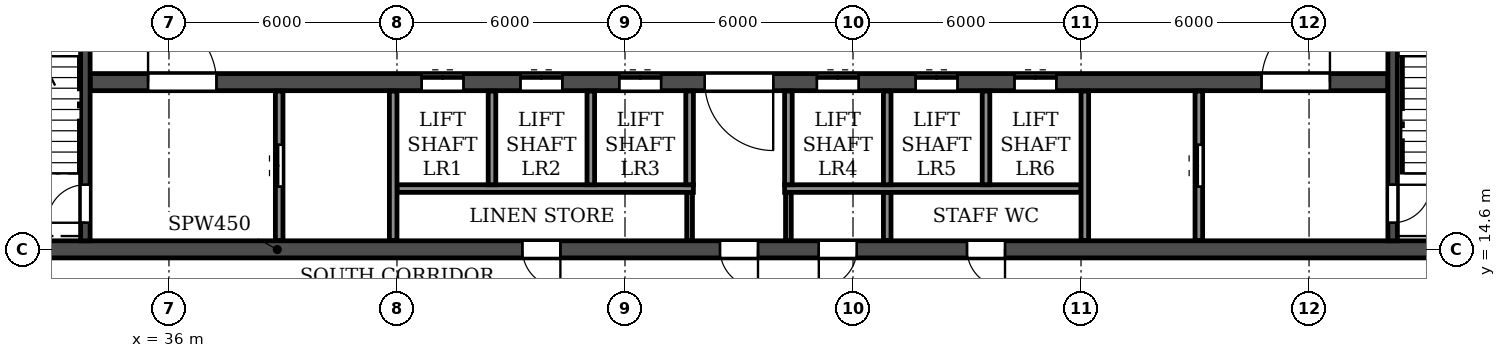
"""IFC4 building model, lengths in metres.
Left out: names, types, materials, properties, quantities, classifications, styles, units other than length and angle.
Written with IfcOpenShell. Run it as: python <this file> out.ifc"""

import sys

from ifc_helpers import new_model, si_unit, direction, frame, frame_2d, origin, place, context, subcontext, project, spatial, rectangle, extrude, element, fill, save


model = new_model("IFC4")
c1 = context("Model", 3, precision=1e-05, world=origin(), true_north=direction((0.0, 1.0)))
c2 = subcontext(c1, "Body", "Model", "MODEL_VIEW")
j1 = project(units=[si_unit("LENGTHUNIT", "METRE"), si_unit("PLANEANGLEUNIT", "RADIAN")], contexts=[c1])
p1 = place(None, origin())
s1 = spatial("IfcSite", under=j1, at=p1, CompositionType="ELEMENT")
p2 = place(p1, origin())
s2 = spatial("IfcBuilding", under=s1, at=p2, CompositionType="ELEMENT")
p3 = place(p2, frame((0.0, 0.0, 19.2)))
s3 = spatial("IfcBuildingStorey", under=s2, at=p3, CompositionType="ELEMENT", Elevation=19.2)
p4 = place(p3, frame((18.0, 14.6, 0.0), z_axis=(0.0, 0.0, 1.0), x_axis=(1.0, 0.0, 0.0)))
e1 = element("IfcWall", 1, at=p4, inside=s3, PredefinedType="SOLIDWALL", context=c2, shape_type="SweptSolid", body=[
    extrude(rectangle(XDim=66.0, YDim=0.45, at=frame_2d((33.0, 0.0))), origin(), (0.0, 0.0, 1.0), 3.95),
])
p5 = place(p4, frame((0.9, 0.0, 0.0)))
e2 = element("IfcOpeningElement", 2, at=p5, cuts=e1, PredefinedType="OPENING", context=c2, shape_type="SweptSolid", body=[
    extrude(rectangle(XDim=1.0, YDim=2.1, at=frame_2d((0.5, 1.05))), frame((0.0, 0.235, 0.0), z_axis=(0.0, -1.0, 0.0), x_axis=(1.0, 0.0, 0.0)), (0.0, 0.0, 1.0), 0.47),
])
p6 = place(p4, frame((8.8, 0.0, 0.0)))
e3 = element("IfcOpeningElement", 3, at=p6, cuts=e1, PredefinedType="OPENING", context=c2, shape_type="SweptSolid", body=[
    extrude(rectangle(XDim=1.0, YDim=2.1, at=frame_2d((0.5, 1.05))), frame((0.0, 0.235, 0.0), z_axis=(0.0, -1.0, 0.0), x_axis=(1.0, 0.0, 0.0)), (0.0, 0.0, 1.0), 0.47),
])
p7 = place(p4, frame((13.4, 0.0, 0.0)))
e4 = element("IfcOpeningElement", 4, at=p7, cuts=e1, PredefinedType="OPENING", context=c2, shape_type="SweptSolid", body=[
    extrude(rectangle(XDim=1.0, YDim=2.1, at=frame_2d((0.5, 1.05))), frame((0.0, 0.235, 0.0), z_axis=(0.0, -1.0, 0.0), x_axis=(1.0, 0.0, 0.0)), (0.0, 0.0, 1.0), 0.47),
])
p8 = place(p4, frame((27.3, 0.0, 0.0)))
e5 = element("IfcOpeningElement", 5, at=p8, cuts=e1, PredefinedType="OPENING", context=c2, shape_type="SweptSolid", body=[
    extrude(rectangle(XDim=1.0, YDim=2.1, at=frame_2d((0.5, 1.05))), frame((0.0, 0.235, 0.0), z_axis=(0.0, -1.0, 0.0), x_axis=(1.0, 0.0, 0.0)), (0.0, 0.0, 1.0), 0.47),
])
p9 = place(p4, frame((32.5, 0.0, 0.0)))
e6 = element("IfcOpeningElement", 6, at=p9, cuts=e1, PredefinedType="OPENING", context=c2, shape_type="SweptSolid", body=[
    extrude(rectangle(XDim=1.0, YDim=2.1, at=frame_2d((0.5, 1.05))), frame((0.0, 0.235, 0.0), z_axis=(0.0, -1.0, 0.0), x_axis=(1.0, 0.0, 0.0)), (0.0, 0.0, 1.0), 0.47),
])
p10 = place(p4, frame((35.1, 0.0, 0.0)))
e7 = element("IfcOpeningElement", 7, at=p10, cuts=e1, PredefinedType="OPENING", context=c2, shape_type="SweptSolid", body=[
    extrude(rectangle(XDim=1.0, YDim=2.1, at=frame_2d((0.5, 1.05))), frame((0.0, 0.235, 0.0), z_axis=(0.0, -1.0, 0.0), x_axis=(1.0, 0.0, 0.0)), (0.0, 0.0, 1.0), 0.47),
])
p11 = place(p4, frame((39.0, 0.0, 0.0)))
e8 = element("IfcOpeningElement", 8, at=p11, cuts=e1, PredefinedType="OPENING", context=c2, shape_type="SweptSolid", body=[
    extrude(rectangle(XDim=1.0, YDim=2.1, at=frame_2d((0.5, 1.05))), frame((0.0, 0.235, 0.0), z_axis=(0.0, -1.0, 0.0), x_axis=(1.0, 0.0, 0.0)), (0.0, 0.0, 1.0), 0.47),
])
p12 = place(p4, frame((51.6, 0.0, 0.0)))
e9 = element("IfcOpeningElement", 9, at=p12, cuts=e1, PredefinedType="OPENING", context=c2, shape_type="SweptSolid", body=[
    extrude(rectangle(XDim=1.0, YDim=2.1, at=frame_2d((0.5, 1.05))), frame((0.0, 0.235, 0.0), z_axis=(0.0, -1.0, 0.0), x_axis=(1.0, 0.0, 0.0)), (0.0, 0.0, 1.0), 0.47),
])
p13 = place(p4, frame((56.25, 0.0, 0.0)))
e10 = element("IfcOpeningElement", 10, at=p13, cuts=e1, PredefinedType="OPENING", context=c2, shape_type="SweptSolid", body=[
    extrude(rectangle(XDim=0.9, YDim=2.1, at=frame_2d((0.45, 1.05))), frame((0.0, 0.235, 0.0), z_axis=(0.0, -1.0, 0.0), x_axis=(1.0, 0.0, 0.0)), (0.0, 0.0, 1.0), 0.47),
])
p14 = place(p4, frame((64.1, 0.0, 0.0)))
e11 = element("IfcOpeningElement", 11, at=p14, cuts=e1, PredefinedType="OPENING", context=c2, shape_type="SweptSolid", body=[
    extrude(rectangle(XDim=1.0, YDim=2.1, at=frame_2d((0.5, 1.05))), frame((0.0, 0.235, 0.0), z_axis=(0.0, -1.0, 0.0), x_axis=(1.0, 0.0, 0.0)), (0.0, 0.0, 1.0), 0.47),
])
p15 = place(p3, frame((33.925, 19.0, 0.0), z_axis=(0.0, 0.0, 1.0), x_axis=(1.0, 0.0, 0.0)))
e12 = element("IfcWall", 12, at=p15, inside=s3, PredefinedType="SOLIDWALL", context=c2, shape_type="SweptSolid", body=[
    extrude(rectangle(XDim=34.15, YDim=0.45, at=frame_2d((17.075, 0.0))), origin(), (0.0, 0.0, 1.0), 3.95),
])
p16 = place(p15, frame((16.175, 0.0, 0.0)))
e13 = element("IfcOpeningElement", 13, at=p16, cuts=e12, PredefinedType="OPENING", context=c2, shape_type="SweptSolid", body=[
    extrude(rectangle(XDim=1.8, YDim=2.1, at=frame_2d((0.9, 1.05))), frame((0.0, 0.235, 0.0), z_axis=(0.0, -1.0, 0.0), x_axis=(1.0, 0.0, 0.0)), (0.0, 0.0, 1.0), 0.47),
])
p17 = place(p15, frame((1.525, 0.0, 0.0)))
e14 = element("IfcOpeningElement", 14, at=p17, cuts=e12, PredefinedType="OPENING", context=c2, shape_type="SweptSolid", body=[
    extrude(rectangle(XDim=1.8, YDim=2.1, at=frame_2d((0.9, 1.05))), frame((0.0, 0.235, 0.0), z_axis=(0.0, -1.0, 0.0), x_axis=(1.0, 0.0, 0.0)), (0.0, 0.0, 1.0), 0.47),
])
p18 = place(p15, frame((8.725, 0.0, 0.0)))
e15 = element("IfcOpeningElement", 15, at=p18, cuts=e12, PredefinedType="OPENING", context=c2, shape_type="SweptSolid", body=[
    extrude(rectangle(XDim=1.1, YDim=2.1, at=frame_2d((0.55, 1.05))), frame((0.0, 0.235, 0.0), z_axis=(0.0, -1.0, 0.0), x_axis=(1.0, 0.0, 0.0)), (0.0, 0.0, 1.0), 0.47),
])
p19 = place(p15, frame((11.325, 0.0, 0.0)))
e16 = element("IfcOpeningElement", 16, at=p19, cuts=e12, PredefinedType="OPENING", context=c2, shape_type="SweptSolid", body=[
    extrude(rectangle(XDim=1.1, YDim=2.1, at=frame_2d((0.55, 1.05))), frame((0.0, 0.235, 0.0), z_axis=(0.0, -1.0, 0.0), x_axis=(1.0, 0.0, 0.0)), (0.0, 0.0, 1.0), 0.47),
])
p20 = place(p15, frame((13.925, 0.0, 0.0)))
e17 = element("IfcOpeningElement", 17, at=p20, cuts=e12, PredefinedType="OPENING", context=c2, shape_type="SweptSolid", body=[
    extrude(rectangle(XDim=1.1, YDim=2.1, at=frame_2d((0.55, 1.05))), frame((0.0, 0.235, 0.0), z_axis=(0.0, -1.0, 0.0), x_axis=(1.0, 0.0, 0.0)), (0.0, 0.0, 1.0), 0.47),
])
p21 = place(p15, frame((19.125, 0.0, 0.0)))
e18 = element("IfcOpeningElement", 18, at=p21, cuts=e12, PredefinedType="OPENING", context=c2, shape_type="SweptSolid", body=[
    extrude(rectangle(XDim=1.1, YDim=2.1, at=frame_2d((0.55, 1.05))), frame((0.0, 0.235, 0.0), z_axis=(0.0, -1.0, 0.0), x_axis=(1.0, 0.0, 0.0)), (0.0, 0.0, 1.0), 0.47),
])
p22 = place(p15, frame((21.725, 0.0, 0.0)))
e19 = element("IfcOpeningElement", 19, at=p22, cuts=e12, PredefinedType="OPENING", context=c2, shape_type="SweptSolid", body=[
    extrude(rectangle(XDim=1.1, YDim=2.1, at=frame_2d((0.55, 1.05))), frame((0.0, 0.235, 0.0), z_axis=(0.0, -1.0, 0.0), x_axis=(1.0, 0.0, 0.0)), (0.0, 0.0, 1.0), 0.47),
])
p23 = place(p15, frame((24.325, 0.0, 0.0)))
e20 = element("IfcOpeningElement", 20, at=p23, cuts=e12, PredefinedType="OPENING", context=c2, shape_type="SweptSolid", body=[
    extrude(rectangle(XDim=1.1, YDim=2.1, at=frame_2d((0.55, 1.05))), frame((0.0, 0.235, 0.0), z_axis=(0.0, -1.0, 0.0), x_axis=(1.0, 0.0, 0.0)), (0.0, 0.0, 1.0), 0.47),
])
p24 = place(p15, frame((30.825, 0.0, 0.0)))
e21 = element("IfcOpeningElement", 21, at=p24, cuts=e12, PredefinedType="OPENING", context=c2, shape_type="SweptSolid", body=[
    extrude(rectangle(XDim=1.8, YDim=2.1, at=frame_2d((0.9, 1.05))), frame((0.0, 0.235, 0.0), z_axis=(0.0, -1.0, 0.0), x_axis=(1.0, 0.0, 0.0)), (0.0, 0.0, 1.0), 0.47),
])
p25 = place(p3, frame((33.8, 14.825, 0.0), z_axis=(0.0, 0.0, 1.0), x_axis=(0.0, 1.0, 0.0)))
e22 = element("IfcWall", 22, at=p25, inside=s3, PredefinedType="SOLIDWALL", context=c2, shape_type="SweptSolid", body=[
    extrude(rectangle(XDim=7.65, YDim=0.25, at=frame_2d((3.825, 0.0))), origin(), (0.0, 0.0, 1.0), 3.95),
])
p26 = place(p25, frame((0.475, 0.0, 0.0)))
e23 = element("IfcOpeningElement", 23, at=p26, cuts=e22, PredefinedType="OPENING", context=c2, shape_type="SweptSolid", body=[
    extrude(rectangle(XDim=1.0, YDim=2.1, at=frame_2d((0.5, 1.05))), frame((0.0, 0.135, 0.0), z_axis=(0.0, -1.0, 0.0), x_axis=(1.0, 0.0, 0.0)), (0.0, 0.0, 1.0), 0.27),
])
p27 = place(p3, frame((68.2, 14.825, 0.0), z_axis=(0.0, 0.0, 1.0), x_axis=(0.0, 1.0, 0.0)))
e24 = element("IfcWall", 24, at=p27, inside=s3, PredefinedType="SOLIDWALL", context=c2, shape_type="SweptSolid", body=[
    extrude(rectangle(XDim=7.65, YDim=0.25, at=frame_2d((3.825, 0.0))), origin(), (0.0, 0.0, 1.0), 3.95),
])
p28 = place(p27, frame((0.475, 0.0, 0.0)))
e25 = element("IfcOpeningElement", 25, at=p28, cuts=e24, PredefinedType="OPENING", context=c2, shape_type="SweptSolid", body=[
    extrude(rectangle(XDim=1.0, YDim=2.1, at=frame_2d((0.5, 1.05))), frame((0.0, 0.135, 0.0), z_axis=(0.0, -1.0, 0.0), x_axis=(1.0, 0.0, 0.0)), (0.0, 0.0, 1.0), 0.27),
])
for number, where, z_axis, x_axis in (
    (26, (49.7, 14.835, 0.0), (0.0, 0.0, 1.0), (0.0, 1.0, 0.0)),
    (27, (52.3, 14.835, 0.0), (0.0, 0.0, 1.0), (0.0, 1.0, 0.0)),
):
    element("IfcWall", number, at=place(p3, frame(where, z_axis=z_axis, x_axis=x_axis)), inside=s3, PredefinedType="PARTITIONING", context=c2, shape_type="SweptSolid", body=[
        extrude(rectangle(XDim=1.265, YDim=0.15, at=frame_2d((0.633, 0.0))), origin(), (0.0, 0.0, 1.0), 3.95),
    ])
p29 = place(p3, frame((54.9, 14.835, 0.0), z_axis=(0.0, 0.0, 1.0), x_axis=(0.0, 1.0, 0.0)))
e28 = element("IfcWall", 28, at=p29, inside=s3, PredefinedType="PARTITIONING", context=c2, shape_type="SweptSolid", body=[
    extrude(rectangle(XDim=1.265, YDim=0.2, at=frame_2d((0.633, 0.0))), origin(), (0.0, 0.0, 1.0), 3.95),
])
for number, where, z_axis, x_axis in (
    (29, (42.0, 16.2, 0.0), (0.0, 0.0, 1.0), (1.0, 0.0, 0.0)),
    (30, (52.2, 16.2, 0.0), (0.0, 0.0, 1.0), (1.0, 0.0, 0.0)),
):
    element("IfcWall", number, at=place(p3, frame(where, z_axis=z_axis, x_axis=x_axis)), inside=s3, PredefinedType="PARTITIONING", context=c2, shape_type="SweptSolid", body=[
        extrude(rectangle(XDim=7.8, YDim=0.2, at=frame_2d((3.9, 0.0))), origin(), (0.0, 0.0, 1.0), 3.95),
    ])
p30 = place(p3, frame((38.9, 14.835, 0.0), z_axis=(0.0, 0.0, 1.0), x_axis=(0.0, 1.0, 0.0)))
e31 = element("IfcWall", 31, at=p30, inside=s3, PredefinedType="PARTITIONING", context=c2, shape_type="SweptSolid", body=[
    extrude(rectangle(XDim=3.93, YDim=0.2, at=frame_2d((1.965, 0.0))), origin(), (0.0, 0.0, 1.0), 3.95),
])
p31 = place(p30, frame((1.415, 0.0, 0.0)))
e32 = element("IfcOpeningElement", 32, at=p31, cuts=e31, PredefinedType="OPENING", context=c2, shape_type="SweptSolid", body=[
    extrude(rectangle(XDim=1.1, YDim=2.1, at=frame_2d((0.55, 1.05))), frame((0.0, 0.11, 0.0), z_axis=(0.0, -1.0, 0.0), x_axis=(1.0, 0.0, 0.0)), (0.0, 0.0, 1.0), 0.22),
])
p32 = place(p3, frame((41.9, 14.835, 0.0), z_axis=(0.0, 0.0, 1.0), x_axis=(0.0, 1.0, 0.0)))
e33 = element("IfcWall", 33, at=p32, inside=s3, PredefinedType="PARTITIONING", context=c2, shape_type="SweptSolid", body=[
    extrude(rectangle(XDim=3.93, YDim=0.2, at=frame_2d((1.965, 0.0))), origin(), (0.0, 0.0, 1.0), 3.95),
])
for number, where, z_axis, x_axis in (
    (34, (44.5, 16.3, 0.0), (0.0, 0.0, 1.0), (0.0, 1.0, 0.0)),
    (35, (47.1, 16.3, 0.0), (0.0, 0.0, 1.0), (0.0, 1.0, 0.0)),
    (36, (49.7, 16.3, 0.0), (0.0, 0.0, 1.0), (0.0, 1.0, 0.0)),
    (37, (52.3, 16.3, 0.0), (0.0, 0.0, 1.0), (0.0, 1.0, 0.0)),
    (38, (54.9, 16.3, 0.0), (0.0, 0.0, 1.0), (0.0, 1.0, 0.0)),
    (39, (57.5, 16.3, 0.0), (0.0, 0.0, 1.0), (0.0, 1.0, 0.0)),
):
    element("IfcWall", number, at=place(p3, frame(where, z_axis=z_axis, x_axis=x_axis)), inside=s3, PredefinedType="PARTITIONING", context=c2, shape_type="SweptSolid", body=[
        extrude(rectangle(XDim=2.465, YDim=0.2, at=frame_2d((1.232, 0.0))), origin(), (0.0, 0.0, 1.0), 3.95),
    ])
p33 = place(p3, frame((60.1, 14.835, 0.0), z_axis=(0.0, 0.0, 1.0), x_axis=(0.0, 1.0, 0.0)))
e40 = element("IfcWall", 40, at=p33, inside=s3, PredefinedType="PARTITIONING", context=c2, shape_type="SweptSolid", body=[
    extrude(rectangle(XDim=3.93, YDim=0.2, at=frame_2d((1.965, 0.0))), origin(), (0.0, 0.0, 1.0), 3.95),
])
p34 = place(p3, frame((63.1, 14.835, 0.0), z_axis=(0.0, 0.0, 1.0), x_axis=(0.0, 1.0, 0.0)))
e41 = element("IfcWall", 41, at=p34, inside=s3, PredefinedType="PARTITIONING", context=c2, shape_type="SweptSolid", body=[
    extrude(rectangle(XDim=3.93, YDim=0.2, at=frame_2d((1.965, 0.0))), origin(), (0.0, 0.0, 1.0), 3.95),
])
p35 = place(p34, frame((1.415, 0.0, 0.0)))
e42 = element("IfcOpeningElement", 42, at=p35, cuts=e41, PredefinedType="OPENING", context=c2, shape_type="SweptSolid", body=[
    extrude(rectangle(XDim=1.1, YDim=2.1, at=frame_2d((0.55, 1.05))), frame((0.0, 0.11, 0.0), z_axis=(0.0, -1.0, 0.0), x_axis=(1.0, 0.0, 0.0)), (0.0, 0.0, 1.0), 0.22),
])
p36 = place(p8, frame((1.0, 0.0, 0.0), z_axis=(0.0, 0.0, 1.0), x_axis=(-1.0, 0.0, 0.0)))
e43 = element("IfcDoor", 43, at=p36, inside=s3, OperationType="SINGLE_SWING_LEFT", PredefinedType="DOOR", context=c2, shape_type="SweptSolid", body=[
    extrude(rectangle(XDim=1.0, YDim=2.1, at=frame_2d((0.5, 1.05))), frame((0.0, 0.025, 0.0), z_axis=(0.0, -1.0, 0.0), x_axis=(1.0, 0.0, 0.0)), (0.0, 0.0, 1.0), 0.05),
])
fill(e5, e43)
p37 = place(p9, frame((1.0, 0.0, 0.0), z_axis=(0.0, 0.0, 1.0), x_axis=(-1.0, 0.0, 0.0)))
e44 = element("IfcDoor", 44, at=p37, inside=s3, OperationType="SINGLE_SWING_LEFT", PredefinedType="DOOR", context=c2, shape_type="SweptSolid", body=[
    extrude(rectangle(XDim=1.0, YDim=2.1, at=frame_2d((0.5, 1.05))), frame((0.0, 0.025, 0.0), z_axis=(0.0, -1.0, 0.0), x_axis=(1.0, 0.0, 0.0)), (0.0, 0.0, 1.0), 0.05),
])
fill(e6, e44)
p38 = place(p10, frame((1.0, 0.0, 0.0), z_axis=(0.0, 0.0, 1.0), x_axis=(-1.0, 0.0, 0.0)))
e45 = element("IfcDoor", 45, at=p38, inside=s3, OperationType="SINGLE_SWING_RIGHT", PredefinedType="DOOR", context=c2, shape_type="SweptSolid", body=[
    extrude(rectangle(XDim=1.0, YDim=2.1, at=frame_2d((0.5, 1.05))), frame((0.0, 0.025, 0.0), z_axis=(0.0, -1.0, 0.0), x_axis=(1.0, 0.0, 0.0)), (0.0, 0.0, 1.0), 0.05),
])
fill(e7, e45)
p39 = place(p11, frame((1.0, 0.0, 0.0), z_axis=(0.0, 0.0, 1.0), x_axis=(-1.0, 0.0, 0.0)))
e46 = element("IfcDoor", 46, at=p39, inside=s3, OperationType="SINGLE_SWING_LEFT", PredefinedType="DOOR", context=c2, shape_type="SweptSolid", body=[
    extrude(rectangle(XDim=1.0, YDim=2.1, at=frame_2d((0.5, 1.05))), frame((0.0, 0.025, 0.0), z_axis=(0.0, -1.0, 0.0), x_axis=(1.0, 0.0, 0.0)), (0.0, 0.0, 1.0), 0.05),
])
fill(e8, e46)
p40 = place(p35, origin())
e47 = element("IfcDoor", 47, at=p40, inside=s3, OperationType="DOUBLE_DOOR_SLIDING", PredefinedType="DOOR", context=c2, shape_type="SweptSolid", body=[
    extrude(rectangle(XDim=1.1, YDim=2.1, at=frame_2d((0.55, 1.05))), frame((0.0, 0.025, 0.0), z_axis=(0.0, -1.0, 0.0), x_axis=(1.0, 0.0, 0.0)), (0.0, 0.0, 1.0), 0.05),
])
fill(e42, e47)
p41 = place(p28, frame((1.0, 0.0, 0.0), z_axis=(0.0, 0.0, 1.0), x_axis=(-1.0, 0.0, 0.0)))
e48 = element("IfcDoor", 48, at=p41, inside=s3, OperationType="SINGLE_SWING_LEFT", PredefinedType="DOOR", context=c2, shape_type="SweptSolid", body=[
    extrude(rectangle(XDim=1.0, YDim=2.1, at=frame_2d((0.5, 1.05))), frame((0.0, 0.025, 0.0), z_axis=(0.0, -1.0, 0.0), x_axis=(1.0, 0.0, 0.0)), (0.0, 0.0, 1.0), 0.05),
])
fill(e25, e48)
p42 = place(p26, origin())
e49 = element("IfcDoor", 49, at=p42, inside=s3, OperationType="SINGLE_SWING_LEFT", PredefinedType="DOOR", context=c2, shape_type="SweptSolid", body=[
    extrude(rectangle(XDim=1.0, YDim=2.1, at=frame_2d((0.5, 1.05))), frame((0.0, 0.025, 0.0), z_axis=(0.0, -1.0, 0.0), x_axis=(1.0, 0.0, 0.0)), (0.0, 0.0, 1.0), 0.05),
])
fill(e23, e49)
p43 = place(p31, origin())
e50 = element("IfcDoor", 50, at=p43, inside=s3, OperationType="DOUBLE_DOOR_SLIDING", PredefinedType="DOOR", context=c2, shape_type="SweptSolid", body=[
    extrude(rectangle(XDim=1.1, YDim=2.1, at=frame_2d((0.55, 1.05))), frame((0.0, 0.025, 0.0), z_axis=(0.0, -1.0, 0.0), x_axis=(1.0, 0.0, 0.0)), (0.0, 0.0, 1.0), 0.05),
])
fill(e32, e50)
p44 = place(p16, frame((1.8, 0.0, 0.0), z_axis=(0.0, 0.0, 1.0), x_axis=(-1.0, 0.0, 0.0)))
e51 = element("IfcDoor", 51, at=p44, inside=s3, OperationType="DOUBLE_DOOR_SINGLE_SWING", PredefinedType="DOOR", context=c2, shape_type="SweptSolid", body=[
    extrude(rectangle(XDim=1.8, YDim=2.1, at=frame_2d((0.9, 1.05))), frame((0.0, 0.025, 0.0), z_axis=(0.0, -1.0, 0.0), x_axis=(1.0, 0.0, 0.0)), (0.0, 0.0, 1.0), 0.05),
])
fill(e13, e51)
p45 = place(p17, origin())
e52 = element("IfcDoor", 52, at=p45, inside=s3, OperationType="DOUBLE_DOOR_SINGLE_SWING", PredefinedType="DOOR", context=c2, shape_type="SweptSolid", body=[
    extrude(rectangle(XDim=1.8, YDim=2.1, at=frame_2d((0.9, 1.05))), frame((0.0, 0.025, 0.0), z_axis=(0.0, -1.0, 0.0), x_axis=(1.0, 0.0, 0.0)), (0.0, 0.0, 1.0), 0.05),
])
fill(e14, e52)
p46 = place(p18, origin())
e53 = element("IfcDoor", 53, at=p46, inside=s3, OperationType="DOUBLE_DOOR_SLIDING", PredefinedType="DOOR", context=c2, shape_type="SweptSolid", body=[
    extrude(rectangle(XDim=1.1, YDim=2.1, at=frame_2d((0.55, 1.05))), frame((0.0, 0.025, 0.0), z_axis=(0.0, -1.0, 0.0), x_axis=(1.0, 0.0, 0.0)), (0.0, 0.0, 1.0), 0.05),
])
fill(e15, e53)
p47 = place(p19, origin())
e54 = element("IfcDoor", 54, at=p47, inside=s3, OperationType="DOUBLE_DOOR_SLIDING", PredefinedType="DOOR", context=c2, shape_type="SweptSolid", body=[
    extrude(rectangle(XDim=1.1, YDim=2.1, at=frame_2d((0.55, 1.05))), frame((0.0, 0.025, 0.0), z_axis=(0.0, -1.0, 0.0), x_axis=(1.0, 0.0, 0.0)), (0.0, 0.0, 1.0), 0.05),
])
fill(e16, e54)
p48 = place(p20, origin())
e55 = element("IfcDoor", 55, at=p48, inside=s3, OperationType="DOUBLE_DOOR_SLIDING", PredefinedType="DOOR", context=c2, shape_type="SweptSolid", body=[
    extrude(rectangle(XDim=1.1, YDim=2.1, at=frame_2d((0.55, 1.05))), frame((0.0, 0.025, 0.0), z_axis=(0.0, -1.0, 0.0), x_axis=(1.0, 0.0, 0.0)), (0.0, 0.0, 1.0), 0.05),
])
fill(e17, e55)
p49 = place(p21, origin())
e56 = element("IfcDoor", 56, at=p49, inside=s3, OperationType="DOUBLE_DOOR_SLIDING", PredefinedType="DOOR", context=c2, shape_type="SweptSolid", body=[
    extrude(rectangle(XDim=1.1, YDim=2.1, at=frame_2d((0.55, 1.05))), frame((0.0, 0.025, 0.0), z_axis=(0.0, -1.0, 0.0), x_axis=(1.0, 0.0, 0.0)), (0.0, 0.0, 1.0), 0.05),
])
fill(e18, e56)
p50 = place(p22, origin())
e57 = element("IfcDoor", 57, at=p50, inside=s3, OperationType="DOUBLE_DOOR_SLIDING", PredefinedType="DOOR", context=c2, shape_type="SweptSolid", body=[
    extrude(rectangle(XDim=1.1, YDim=2.1, at=frame_2d((0.55, 1.05))), frame((0.0, 0.025, 0.0), z_axis=(0.0, -1.0, 0.0), x_axis=(1.0, 0.0, 0.0)), (0.0, 0.0, 1.0), 0.05),
])
fill(e19, e57)
p51 = place(p23, origin())
e58 = element("IfcDoor", 58, at=p51, inside=s3, OperationType="DOUBLE_DOOR_SLIDING", PredefinedType="DOOR", context=c2, shape_type="SweptSolid", body=[
    extrude(rectangle(XDim=1.1, YDim=2.1, at=frame_2d((0.55, 1.05))), frame((0.0, 0.025, 0.0), z_axis=(0.0, -1.0, 0.0), x_axis=(1.0, 0.0, 0.0)), (0.0, 0.0, 1.0), 0.05),
])
fill(e20, e58)
p52 = place(p24, origin())
e59 = element("IfcDoor", 59, at=p52, inside=s3, OperationType="DOUBLE_DOOR_SINGLE_SWING", PredefinedType="DOOR", context=c2, shape_type="SweptSolid", body=[
    extrude(rectangle(XDim=1.8, YDim=2.1, at=frame_2d((0.9, 1.05))), frame((0.0, 0.025, 0.0), z_axis=(0.0, -1.0, 0.0), x_axis=(1.0, 0.0, 0.0)), (0.0, 0.0, 1.0), 0.05),
])
fill(e21, e59)
save(model, sys.argv[1])
